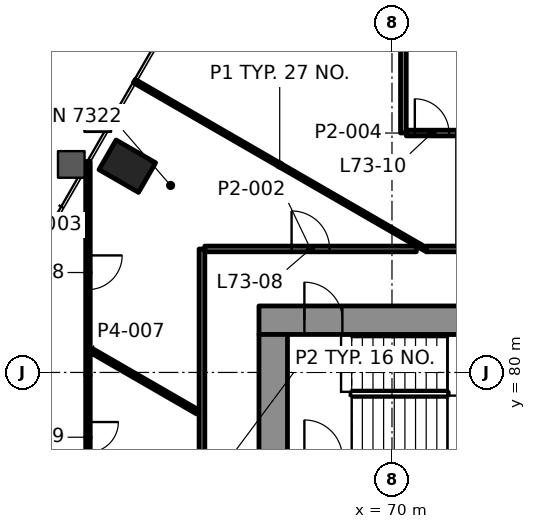
"""IFC4 building model, lengths in metres.
Left out: names, types, materials, properties, quantities, classifications, styles, units other than length and angle.
Written with IfcOpenShell. Run it as: python <this file> out.ifc"""

import sys

from ifc_helpers import new_model, si_unit, direction, frame, frame_2d, origin, origin_2d, place, context, subcontext, project, spatial, rectangle, hollow_rectangle, extrude, element, fill, save


model = new_model("IFC4")
c1 = context("Model", 3, precision=1e-05, world=origin(), true_north=direction((0.0, 1.0)))
c2 = subcontext(c1, "Body", "Model", "MODEL_VIEW")
j1 = project(units=[si_unit("LENGTHUNIT", "METRE"), si_unit("PLANEANGLEUNIT", "RADIAN")], contexts=[c1])
p1 = place(None, origin())
s1 = spatial("IfcSite", under=j1, at=p1, CompositionType="ELEMENT")
p2 = place(p1, origin())
s2 = spatial("IfcBuilding", under=s1, at=p2, CompositionType="ELEMENT")
p3 = place(p2, frame((0.0, 0.0, 302.1)))
s3 = spatial("IfcBuildingStorey", under=s2, at=p3, CompositionType="ELEMENT", Elevation=302.1)
p4 = place(p3, frame((63.035, 85.427, -0.0), z_axis=(0.0, 0.0, 1.0), x_axis=(-0.5, -0.866025403784, 0.0)))
e1 = element("IfcColumn", 1, at=p4, inside=s3, PredefinedType="COLUMN", context=c2, shape_type="SweptSolid", body=[
    extrude(hollow_rectangle(XDim=0.9, YDim=1.2, WallThickness=0.06, at=origin_2d()), origin(), (0.0, 0.0, 1.0), 3.5),
])
p5 = place(p3, frame((66.5, 81.375, 0.0), z_axis=(0.0, 0.0, 1.0), x_axis=(1.0, 0.0, 0.0)))
e2 = element("IfcWall", 2, at=p5, inside=s3, PredefinedType="SHEAR", context=c2, shape_type="SweptSolid", body=[
    extrude(rectangle(XDim=17.0, YDim=0.75, at=frame_2d((8.5, 0.0))), origin(), (0.0, 0.0, 1.0), 3.3),
])
p6 = place(p5, frame((1.195, 0.0, 0.0)))
e3 = element("IfcOpeningElement", 3, at=p6, cuts=e2, PredefinedType="OPENING", context=c2, shape_type="SweptSolid", body=[
    extrude(rectangle(XDim=1.0, YDim=2.1, at=frame_2d((0.5, 1.05))), frame((0.0, 0.385, 0.0), z_axis=(0.0, -1.0, 0.0), x_axis=(1.0, 0.0, 0.0)), (0.0, 0.0, 1.0), 0.77),
])
p7 = place(p5, frame((15.005, 0.0, 0.0)))
e4 = element("IfcOpeningElement", 4, at=p7, cuts=e2, PredefinedType="OPENING", context=c2, shape_type="SweptSolid", body=[
    extrude(rectangle(XDim=1.0, YDim=2.1, at=frame_2d((0.5, 1.05))), frame((0.0, 0.385, 0.0), z_axis=(0.0, -1.0, 0.0), x_axis=(1.0, 0.0, 0.0)), (0.0, 0.0, 1.0), 0.77),
])
p8 = place(p5, frame((8.15, 0.0, 0.0)))
e5 = element("IfcOpeningElement", 5, at=p8, cuts=e2, PredefinedType="OPENING", context=c2, shape_type="SweptSolid", body=[
    extrude(rectangle(XDim=0.9, YDim=2.1, at=frame_2d((0.45, 1.05))), frame((0.0, 0.385, 0.0), z_axis=(0.0, -1.0, 0.0), x_axis=(1.0, 0.0, 0.0)), (0.0, 0.0, 1.0), 0.77),
])
p9 = place(p3, frame((66.875, 69.0, 0.0), z_axis=(0.0, 0.0, 1.0), x_axis=(0.0, 1.0, 0.0)))
e6 = element("IfcWall", 6, at=p9, inside=s3, PredefinedType="SHEAR", context=c2, shape_type="SweptSolid", body=[
    extrude(rectangle(XDim=12.0, YDim=0.75, at=frame_2d((6.0, 0.0))), origin(), (0.0, 0.0, 1.0), 3.3),
])
p10 = place(p9, frame((3.7, 0.0, 0.0)))
e7 = element("IfcOpeningElement", 7, at=p10, cuts=e6, PredefinedType="OPENING", context=c2, shape_type="SweptSolid", body=[
    extrude(rectangle(XDim=1.2, YDim=2.1, at=frame_2d((0.6, 1.05))), frame((0.0, 0.385, 0.0), z_axis=(0.0, -1.0, 0.0), x_axis=(1.0, 0.0, 0.0)), (0.0, 0.0, 1.0), 0.77),
])
p11 = place(p9, frame((0.925, 0.0, 0.0)))
e8 = element("IfcOpeningElement", 8, at=p11, cuts=e6, PredefinedType="OPENING", context=c2, shape_type="SweptSolid", body=[
    extrude(rectangle(XDim=0.9, YDim=2.1, at=frame_2d((0.45, 1.05))), frame((0.0, 0.385, 0.0), z_axis=(0.0, -1.0, 0.0), x_axis=(1.0, 0.0, 0.0)), (0.0, 0.0, 1.0), 0.77),
])
p12 = place(p3, frame((65.075, 83.25, 0.0), z_axis=(0.0, 0.0, 1.0), x_axis=(1.0, 0.0, 0.0)))
e9 = element("IfcWall", 9, at=p12, inside=s3, PredefinedType="PARTITIONING", context=c2, shape_type="SweptSolid", body=[
    extrude(rectangle(XDim=5.565, YDim=0.15, at=frame_2d((2.783, 0.0))), origin(), (0.0, 0.0, 1.0), 2.7),
])
p13 = place(p12, frame((2.283, 0.0, 0.0)))
e10 = element("IfcOpeningElement", 10, at=p13, cuts=e9, PredefinedType="OPENING", context=c2, shape_type="SweptSolid", body=[
    extrude(rectangle(XDim=1.0, YDim=2.1, at=frame_2d((0.5, 1.05))), frame((0.0, 0.085, 0.0), z_axis=(0.0, -1.0, 0.0), x_axis=(1.0, 0.0, 0.0)), (0.0, 0.0, 1.0), 0.17),
])
p14 = place(p3, frame((70.377, 86.3, 0.0), z_axis=(0.0, 0.0, 1.0), x_axis=(1.0, 0.0, 0.0)))
e11 = element("IfcWall", 11, at=p14, inside=s3, PredefinedType="PARTITIONING", context=c2, shape_type="SweptSolid", body=[
    extrude(rectangle(XDim=1.348, YDim=0.15, at=frame_2d((0.674, 0.0))), origin(), (0.0, 0.0, 1.0), 2.7),
])
p15 = place(p14, frame((0.224, 0.0, 0.0)))
e12 = element("IfcOpeningElement", 12, at=p15, cuts=e11, PredefinedType="OPENING", context=c2, shape_type="SweptSolid", body=[
    extrude(rectangle(XDim=0.9, YDim=2.1, at=frame_2d((0.45, 1.05))), frame((0.0, 0.085, 0.0), z_axis=(0.0, -1.0, 0.0), x_axis=(1.0, 0.0, 0.0)), (0.0, 0.0, 1.0), 0.17),
])
p16 = place(p3, frame((70.3, 86.302, 0.0), z_axis=(0.0, 0.0, 1.0), x_axis=(0.0, 1.0, 0.0)))
e13 = element("IfcWall", 13, at=p16, inside=s3, PredefinedType="PARTITIONING", context=c2, shape_type="SweptSolid", body=[
    extrude(rectangle(XDim=9.796, YDim=0.15, at=frame_2d((4.898, 0.0))), origin(), (0.0, 0.0, 1.0), 2.7),
])
p17 = place(p3, frame((65.0, 70.266, 0.0), z_axis=(0.0, 0.0, 1.0), x_axis=(0.0, 1.0, 0.0)))
e14 = element("IfcWall", 14, at=p17, inside=s3, PredefinedType="PARTITIONING", context=c2, shape_type="SweptSolid", body=[
    extrude(rectangle(XDim=12.984, YDim=0.15, at=frame_2d((6.492, 0.0))), origin(), (0.0, 0.0, 1.0), 2.7),
])
p18 = place(p3, frame((62.0, 85.554, 0.0), z_axis=(0.0, 0.0, 1.0), x_axis=(0.0, -1.0, 0.0)))
e15 = element("IfcWall", 15, at=p18, inside=s3, PredefinedType="PARTITIONING", context=c2, shape_type="SweptSolid", body=[
    extrude(rectangle(XDim=11.261, YDim=0.12, at=frame_2d((5.63, 0.0))), origin(), (0.0, 0.0, 1.0), 2.688),
])
p19 = place(p18, frame((2.474, 0.0, 0.0)))
e16 = element("IfcOpeningElement", 16, at=p19, cuts=e15, PredefinedType="OPENING", context=c2, shape_type="SweptSolid", body=[
    extrude(rectangle(XDim=0.9, YDim=2.1, at=frame_2d((0.45, 1.05))), frame((0.0, 0.07, 0.0), z_axis=(0.0, -1.0, 0.0), x_axis=(1.0, 0.0, 0.0)), (0.0, 0.0, 1.0), 0.14),
])
p20 = place(p18, frame((6.859, 0.0, 0.0)))
e17 = element("IfcOpeningElement", 17, at=p20, cuts=e15, PredefinedType="OPENING", context=c2, shape_type="SweptSolid", body=[
    extrude(rectangle(XDim=0.8, YDim=2.1, at=frame_2d((0.4, 1.05))), frame((0.0, 0.07, 0.0), z_axis=(0.0, -1.0, 0.0), x_axis=(1.0, 0.0, 0.0)), (0.0, 0.0, 1.0), 0.14),
])
p21 = place(p18, frame((9.876, 0.0, 0.0)))
e18 = element("IfcOpeningElement", 18, at=p21, cuts=e15, PredefinedType="OPENING", context=c2, shape_type="SweptSolid", body=[
    extrude(rectangle(XDim=0.9, YDim=2.1, at=frame_2d((0.45, 1.05))), frame((0.0, 0.07, 0.0), z_axis=(0.0, -1.0, 0.0), x_axis=(1.0, 0.0, 0.0)), (0.0, 0.0, 1.0), 0.14),
])
p22 = place(p3, frame((70.871, 83.25, 0.0), z_axis=(0.0, 0.0, 1.0), x_axis=(-0.866018527528, 0.500011909837, 0.0)))
e19 = element("IfcWall", 19, at=p22, inside=s3, PredefinedType="PARTITIONING", context=c2, shape_type="SweptSolid", body=[
    extrude(rectangle(XDim=8.834, YDim=0.1, at=frame_2d((4.417, 0.0))), origin(), (0.0, 0.0, 1.0), 2.688),
])
p23 = place(p3, frame((64.89, 78.959, 0.0), z_axis=(0.0, 0.0, 1.0), x_axis=(-0.866033195618, 0.499986503906, 0.0)))
e20 = element("IfcWall", 20, at=p23, inside=s3, PredefinedType="PARTITIONING", context=c2, shape_type="SweptSolid", body=[
    extrude(rectangle(XDim=3.228, YDim=0.12, at=frame_2d((1.614, 0.0))), origin(), (0.0, 0.0, 1.0), 2.7),
])
p24 = place(p3, frame((70.896, 83.25, 0.0), z_axis=(0.0, 0.0, 1.0), x_axis=(1.0, 0.0, 0.0)))
e21 = element("IfcWall", 21, at=p24, inside=s3, PredefinedType="PARTITIONING", context=c2, shape_type="SweptSolid", body=[
    extrude(rectangle(XDim=0.905, YDim=0.15, at=frame_2d((0.452, 0.0))), origin(), (0.0, 0.0, 1.0), 2.7),
])
p25 = place(p13, origin())
e22 = element("IfcDoor", 22, at=p25, inside=s3, OperationType="SINGLE_SWING_RIGHT", PredefinedType="DOOR", context=c2, shape_type="SweptSolid", body=[
    extrude(rectangle(XDim=1.0, YDim=2.1, at=frame_2d((0.5, 1.05))), frame((0.0, 0.025, 0.0), z_axis=(0.0, -1.0, 0.0), x_axis=(1.0, 0.0, 0.0)), (0.0, 0.0, 1.0), 0.05),
])
fill(e10, e22)
p26 = place(p15, origin())
e23 = element("IfcDoor", 23, at=p26, inside=s3, OperationType="SINGLE_SWING_LEFT", PredefinedType="DOOR", context=c2, shape_type="SweptSolid", body=[
    extrude(rectangle(XDim=0.9, YDim=2.1, at=frame_2d((0.45, 1.05))), frame((0.0, 0.025, 0.0), z_axis=(0.0, -1.0, 0.0), x_axis=(1.0, 0.0, 0.0)), (0.0, 0.0, 1.0), 0.05),
])
fill(e12, e23)
p27 = place(p19, origin())
e24 = element("IfcDoor", 24, at=p27, inside=s3, OperationType="SINGLE_SWING_RIGHT", PredefinedType="DOOR", context=c2, shape_type="SweptSolid", body=[
    extrude(rectangle(XDim=0.9, YDim=2.1, at=frame_2d((0.45, 1.05))), frame((0.0, 0.025, 0.0), z_axis=(0.0, -1.0, 0.0), x_axis=(1.0, 0.0, 0.0)), (0.0, 0.0, 1.0), 0.05),
])
fill(e16, e24)
p28 = place(p20, origin())
e25 = element("IfcDoor", 25, at=p28, inside=s3, OperationType="SINGLE_SWING_RIGHT", PredefinedType="DOOR", context=c2, shape_type="SweptSolid", body=[
    extrude(rectangle(XDim=0.8, YDim=2.1, at=frame_2d((0.4, 1.05))), frame((0.0, 0.025, 0.0), z_axis=(0.0, -1.0, 0.0), x_axis=(1.0, 0.0, 0.0)), (0.0, 0.0, 1.0), 0.05),
])
fill(e17, e25)
p29 = place(p6, origin())
e26 = element("IfcDoor", 26, at=p29, inside=s3, OperationType="SINGLE_SWING_RIGHT", PredefinedType="DOOR", context=c2, shape_type="SweptSolid", body=[
    extrude(rectangle(XDim=1.0, YDim=2.1, at=frame_2d((0.5, 1.05))), frame((0.0, 0.095, 0.0), z_axis=(0.0, -1.0, 0.0), x_axis=(1.0, 0.0, 0.0)), (0.0, 0.0, 1.0), 0.19),
])
fill(e3, e26)
save(model, sys.argv[1])
